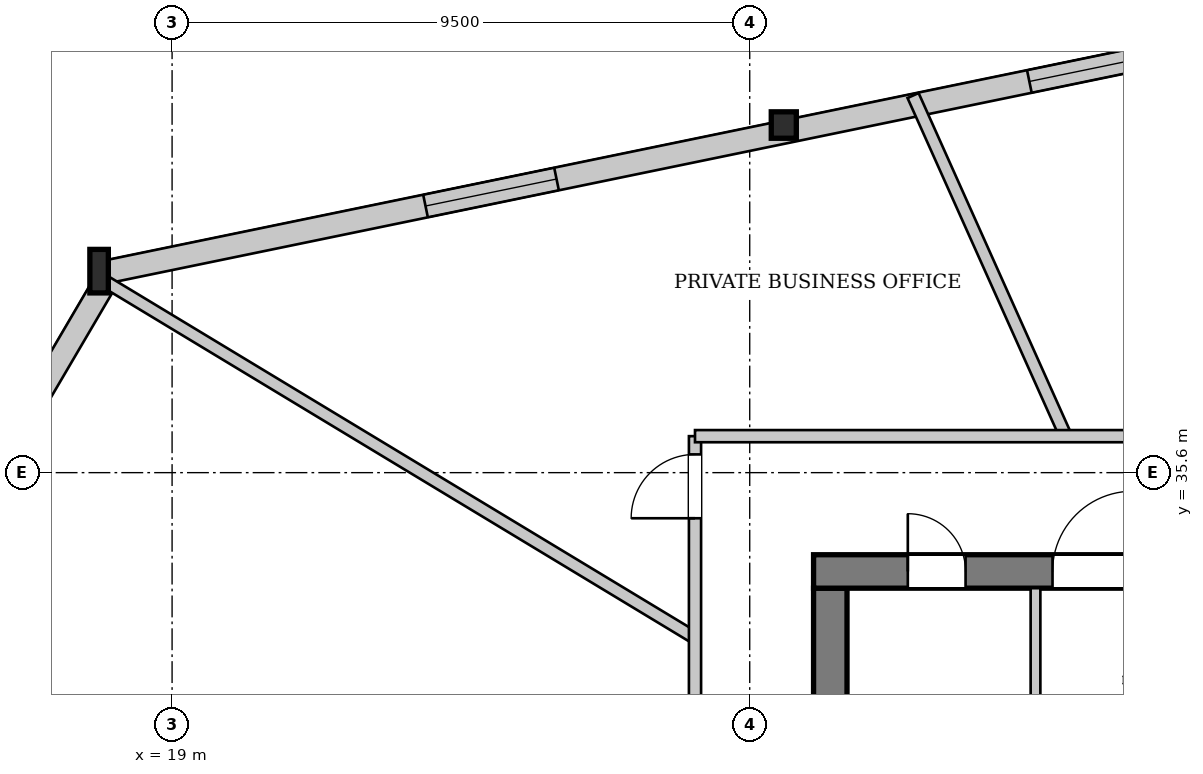
"""IFC4 building model, lengths in metres.
Left out: names, types, materials, properties, quantities, classifications, styles, units other than length and angle.
Written with IfcOpenShell. Run it as: python <this file> out.ifc"""

import sys

from ifc_helpers import new_model, si_unit, direction, frame, frame_2d, origin, origin_2d, place, context, subcontext, project, spatial, rectangle, i_section, extrude, source, transform, mapped, element, fill, save


model = new_model("IFC4")
c1 = context("Model", 3, precision=1e-05, world=origin(), true_north=direction((0.0, 1.0)))
c2 = subcontext(c1, "Body", "Model", "MODEL_VIEW")
j1 = project(units=[si_unit("LENGTHUNIT", "METRE"), si_unit("PLANEANGLEUNIT", "RADIAN")], contexts=[c1])
p1 = place(None, origin())
s1 = spatial("IfcSite", under=j1, at=p1, CompositionType="ELEMENT")
p2 = place(p1, origin())
s2 = spatial("IfcBuilding", under=s1, at=p2, CompositionType="ELEMENT")
p3 = place(p2, frame((0.0, 0.0, 146.6)))
s3 = spatial("IfcBuildingStorey", under=s2, at=p3, CompositionType="ELEMENT", Elevation=146.6)
m1 = source(origin(), c2, "Body", "SweptSolid", [
    extrude(i_section(OverallWidth=0.412, OverallDepth=0.435, WebThickness=0.031, FlangeThickness=0.05, at=origin_2d()), origin(), (0.0, 0.0, 1.0), 3.398),
])
p4 = place(p3, frame((29.172, 41.417, 0.0), z_axis=(-0.066021185682, -0.059124522107, 0.99606500487), x_axis=(0.667126517225, -0.74494443418, 0.0)))
e1 = element("IfcColumn", 1, at=p4, inside=s3, PredefinedType="COLUMN", context=c2, shape_type="MappedRepresentation", body=[
    mapped(m1, transform((0.0, 0.0, 0.0), x_axis=(1.0, 0.0, 0.0), y_axis=(0.0, 1.0, 0.0), z_axis=(0.0, 0.0, 1.0), scale=1.0)),
])
m2 = source(origin(), c2, "Body", "SweptSolid", [
    extrude(i_section(OverallWidth=0.304, OverallDepth=0.716, WebThickness=0.021, FlangeThickness=0.04, at=origin_2d()), origin(), (0.0, 0.0, 1.0), 3.408),
])
p5 = place(p3, frame((17.888, 39.09, 0.0), z_axis=(-0.0518677655, -0.103305687639, 0.993296365544), x_axis=(0.893682251955, -0.448700381703, 0.0)))
e2 = element("IfcColumn", 2, at=p5, inside=s3, PredefinedType="COLUMN", context=c2, shape_type="MappedRepresentation", body=[
    mapped(m2, transform((0.0, 0.0, 0.0), x_axis=(1.0, 0.0, 0.0), y_axis=(0.0, 1.0, 0.0), z_axis=(0.0, 0.0, 1.0), scale=1.0)),
])
p6 = place(p3, frame((20.25, 17.46, 0.0), z_axis=(0.0, 0.0, 1.0), x_axis=(-0.262728395916, 0.964869830588, 0.0)))
e3 = element("IfcWall", 3, at=p6, inside=s3, PredefinedType="SOLIDWALL", context=c2, shape_type="SweptSolid", body=[
    extrude(rectangle(XDim=18.003, YDim=0.32, at=frame_2d((9.002, 0.0))), origin(), (0.0, 0.0, 1.0), 2.692),
])
p7 = place(p6, frame((5.011, 0.0, 0.0)))
e4 = element("IfcOpeningElement", 4, at=p7, cuts=e3, PredefinedType="OPENING", context=c2, shape_type="SweptSolid", body=[
    extrude(rectangle(XDim=1.5, YDim=2.3, at=frame_2d((0.75, 1.15))), frame((0.0, 0.17, 0.0), z_axis=(0.0, -1.0, 0.0), x_axis=(1.0, 0.0, 0.0)), (0.0, 0.0, 1.0), 0.34),
])
p8 = place(p6, frame((12.022, 0.0, 0.25)))
e5 = element("IfcOpeningElement", 5, at=p8, cuts=e3, PredefinedType="OPENING", context=c2, shape_type="SweptSolid", body=[
    extrude(rectangle(XDim=2.6, YDim=2.35, at=frame_2d((1.3, 1.175))), frame((0.0, 0.17, 0.0), z_axis=(0.0, -1.0, 0.0), x_axis=(1.0, 0.0, 0.0)), (0.0, 0.0, 1.0), 0.34),
])
p9 = place(p3, frame((15.529, 34.693, 0.0), z_axis=(0.0, 0.0, 1.0), x_axis=(0.505994696014, 0.86253658914, 0.0)))
e6 = element("IfcWall", 6, at=p9, inside=s3, PredefinedType="SOLIDWALL", context=c2, shape_type="SweptSolid", body=[
    extrude(rectangle(XDim=4.986, YDim=0.38, at=frame_2d((2.493, 0.0))), origin(), (0.0, 0.0, 1.0), 2.692),
])
p10 = place(p3, frame((17.926, 38.903, 0.0), z_axis=(0.0, 0.0, 1.0), x_axis=(0.979384542026, 0.202004749552, 0.0)))
e7 = element("IfcWall", 7, at=p10, inside=s3, PredefinedType="SOLIDWALL", context=c2, shape_type="SweptSolid", body=[
    extrude(rectangle(XDim=23.044, YDim=0.38, at=frame_2d((11.522, 0.0))), origin(), (0.0, 0.0, 1.0), 2.692),
])
p11 = place(p10, frame((5.352, 0.0, 0.322)))
e8 = element("IfcOpeningElement", 8, at=p11, cuts=e7, PredefinedType="OPENING", context=c2, shape_type="SweptSolid", body=[
    extrude(rectangle(XDim=2.2, YDim=2.25, at=frame_2d((1.1, 1.125))), frame((0.0, 0.2, 0.0), z_axis=(0.0, -1.0, 0.0), x_axis=(1.0, 0.0, 0.0)), (0.0, 0.0, 1.0), 0.4),
])
p12 = place(p10, frame((15.492, 0.0, 0.322)))
e9 = element("IfcOpeningElement", 9, at=p12, cuts=e7, PredefinedType="OPENING", context=c2, shape_type="SweptSolid", body=[
    extrude(rectangle(XDim=2.2, YDim=2.25, at=frame_2d((1.1, 1.125))), frame((0.0, 0.2, 0.0), z_axis=(0.0, -1.0, 0.0), x_axis=(1.0, 0.0, 0.0)), (0.0, 0.0, 1.0), 0.4),
])
p13 = place(p3, frame((29.825, 19.5, 0.0), z_axis=(0.0, 0.0, 1.0), x_axis=(0.0, 1.0, 0.0)))
e10 = element("IfcWall", 10, at=p13, inside=s3, PredefinedType="SHEAR", context=c2, shape_type="SweptSolid", body=[
    extrude(rectangle(XDim=14.2, YDim=0.55, at=frame_2d((7.1, 0.0))), origin(), (0.0, 0.0, 1.0), 3.3),
])
p14 = place(p13, frame((7.42, 0.0, 0.0)))
e11 = element("IfcOpeningElement", 11, at=p14, cuts=e10, PredefinedType="OPENING", context=c2, shape_type="SweptSolid", body=[
    extrude(rectangle(XDim=1.6, YDim=2.2, at=frame_2d((0.8, 1.1))), frame((0.0, 0.285, 0.0), z_axis=(0.0, -1.0, 0.0), x_axis=(1.0, 0.0, 0.0)), (0.0, 0.0, 1.0), 0.57),
])
p15 = place(p3, frame((29.55, 33.975, 0.0), z_axis=(0.0, 0.0, 1.0), x_axis=(1.0, 0.0, 0.0)))
e12 = element("IfcWall", 12, at=p15, inside=s3, PredefinedType="SHEAR", context=c2, shape_type="SweptSolid", body=[
    extrude(rectangle(XDim=16.9, YDim=0.55, at=frame_2d((8.45, 0.0))), origin(), (0.0, 0.0, 1.0), 3.3),
])
p16 = place(p15, frame((1.55, 0.0, 0.0)))
e13 = element("IfcOpeningElement", 13, at=p16, cuts=e12, PredefinedType="OPENING", context=c2, shape_type="SweptSolid", body=[
    extrude(rectangle(XDim=0.95, YDim=2.1, at=frame_2d((0.475, 1.05))), frame((0.0, 0.285, 0.0), z_axis=(0.0, -1.0, 0.0), x_axis=(1.0, 0.0, 0.0)), (0.0, 0.0, 1.0), 0.57),
])
p17 = place(p15, frame((3.93, 0.0, 0.0)))
e14 = element("IfcOpeningElement", 14, at=p17, cuts=e12, PredefinedType="OPENING", context=c2, shape_type="SweptSolid", body=[
    extrude(rectangle(XDim=1.32, YDim=2.2, at=frame_2d((0.66, 1.1))), frame((0.0, 0.285, 0.0), z_axis=(0.0, -1.0, 0.0), x_axis=(1.0, 0.0, 0.0)), (0.0, 0.0, 1.0), 0.57),
])
p18 = place(p3, frame((33.2, 28.44, 0.0), z_axis=(0.0, 0.0, 1.0), x_axis=(0.0, 1.0, 0.0)))
e15 = element("IfcWall", 15, at=p18, inside=s3, PredefinedType="PARTITIONING", context=c2, shape_type="SweptSolid", body=[
    extrude(rectangle(XDim=5.26, YDim=0.16, at=frame_2d((2.63, 0.0))), origin(), (0.0, 0.0, 1.0), 3.3),
])
p19 = place(p3, frame((33.697, 36.2, 0.0), z_axis=(0.0, 0.0, 1.0), x_axis=(-0.408999948969, 0.912534405786, 0.0)))
e16 = element("IfcWall", 16, at=p19, inside=s3, PredefinedType="PARTITIONING", context=c2, shape_type="SweptSolid", body=[
    extrude(rectangle(XDim=6.139, YDim=0.2, at=frame_2d((3.069, 0.0))), origin(), (0.0, 0.0, 1.0), 3.3),
])
p20 = place(p3, frame((27.6, 32.883, 0.0), z_axis=(0.0, 0.0, 1.0), x_axis=(-0.855940231104, 0.517074772909, 0.0)))
e17 = element("IfcWall", 17, at=p20, inside=s3, PredefinedType="PARTITIONING", context=c2, shape_type="SweptSolid", body=[
    extrude(rectangle(XDim=11.489, YDim=0.2, at=frame_2d((5.744, 0.0))), origin(), (0.0, 0.0, 1.0), 2.895),
])
p21 = place(p3, frame((27.6, 17.0, 0.0), z_axis=(0.0, 0.0, 1.0), x_axis=(0.0, 1.0, 0.0)))
e18 = element("IfcWall", 18, at=p21, inside=s3, PredefinedType="PARTITIONING", context=c2, shape_type="SweptSolid", body=[
    extrude(rectangle(XDim=19.2, YDim=0.2, at=frame_2d((9.6, 0.0))), origin(), (0.0, 0.0, 1.0), 3.3),
])
p22 = place(p21, frame((17.85, 0.0, 0.0)))
e19 = element("IfcOpeningElement", 19, at=p22, cuts=e18, PredefinedType="OPENING", context=c2, shape_type="SweptSolid", body=[
    extrude(rectangle(XDim=1.05, YDim=2.2, at=frame_2d((0.525, 1.1))), frame((0.0, 0.11, 0.0), z_axis=(0.0, -1.0, 0.0), x_axis=(1.0, 0.0, 0.0)), (0.0, 0.0, 1.0), 0.22),
])
p23 = place(p21, frame((11.918, 0.0, 0.0)))
e20 = element("IfcOpeningElement", 20, at=p23, cuts=e18, PredefinedType="OPENING", context=c2, shape_type="SweptSolid", body=[
    extrude(rectangle(XDim=1.05, YDim=2.2, at=frame_2d((0.525, 1.1))), frame((0.0, 0.11, 0.0), z_axis=(0.0, -1.0, 0.0), x_axis=(1.0, 0.0, 0.0)), (0.0, 0.0, 1.0), 0.22),
])
p24 = place(p21, frame((4.311, 0.0, 0.0)))
e21 = element("IfcOpeningElement", 21, at=p24, cuts=e18, PredefinedType="OPENING", context=c2, shape_type="SweptSolid", body=[
    extrude(rectangle(XDim=1.05, YDim=2.2, at=frame_2d((0.525, 1.1))), frame((0.0, 0.11, 0.0), z_axis=(0.0, -1.0, 0.0), x_axis=(1.0, 0.0, 0.0)), (0.0, 0.0, 1.0), 0.22),
])
p25 = place(p3, frame((27.6, 36.2, 0.0), z_axis=(0.0, 0.0, 1.0), x_axis=(1.0, 0.0, 0.0)))
e22 = element("IfcWall", 22, at=p25, inside=s3, PredefinedType="PARTITIONING", context=c2, shape_type="SweptSolid", body=[
    extrude(rectangle(XDim=13.4, YDim=0.2, at=frame_2d((6.7, 0.0))), origin(), (0.0, 0.0, 1.0), 3.3),
])
p26 = place(p25, frame((8.266, 0.0, 0.0)))
e23 = element("IfcOpeningElement", 23, at=p26, cuts=e22, PredefinedType="OPENING", context=c2, shape_type="SweptSolid", body=[
    extrude(rectangle(XDim=1.05, YDim=2.2, at=frame_2d((0.525, 1.1))), frame((0.0, 0.11, 0.0), z_axis=(0.0, -1.0, 0.0), x_axis=(1.0, 0.0, 0.0)), (0.0, 0.0, 1.0), 0.22),
])
m3 = source(origin(), c2, "Body", "SweptSolid", [
    extrude(rectangle(XDim=2.2, YDim=2.25, at=frame_2d((1.1, 1.125))), frame((0.0, 0.03, 0.0), z_axis=(0.0, -1.0, 0.0), x_axis=(1.0, 0.0, 0.0)), (0.0, 0.0, 1.0), 0.06),
])
p27 = place(p11, origin())
e24 = element("IfcWindow", 24, at=p27, inside=s3, PartitioningType="SINGLE_PANEL", PredefinedType="WINDOW", context=c2, shape_type="MappedRepresentation", body=[
    mapped(m3, transform((0.0, 0.0, 0.0), x_axis=(1.0, 0.0, 0.0), y_axis=(0.0, 1.0, 0.0), z_axis=(0.0, 0.0, 1.0), scale=1.0)),
])
fill(e8, e24)
p28 = place(p12, origin())
e25 = element("IfcWindow", 25, at=p28, inside=s3, PartitioningType="SINGLE_PANEL", PredefinedType="WINDOW", context=c2, shape_type="MappedRepresentation", body=[
    mapped(m3, transform((0.0, 0.0, 0.0), x_axis=(1.0, 0.0, 0.0), y_axis=(0.0, 1.0, 0.0), z_axis=(0.0, 0.0, 1.0), scale=1.0)),
])
fill(e9, e25)
m4 = source(origin(), c2, "Body", "SweptSolid", [
    extrude(rectangle(XDim=0.95, YDim=2.1, at=frame_2d((0.475, 1.05))), frame((0.0, 0.025, 0.0), z_axis=(0.0, -1.0, 0.0), x_axis=(1.0, 0.0, 0.0)), (0.0, 0.0, 1.0), 0.05),
])
p29 = place(p16, origin())
e26 = element("IfcDoor", 26, at=p29, inside=s3, OperationType="SINGLE_SWING_LEFT", PredefinedType="DOOR", context=c2, shape_type="MappedRepresentation", body=[
    mapped(m4, transform((0.0, 0.0, 0.0), x_axis=(1.0, 0.0, 0.0), y_axis=(0.0, 1.0, 0.0), z_axis=(0.0, 0.0, 1.0), scale=1.0)),
])
fill(e13, e26)
m5 = source(origin(), c2, "Body", "SweptSolid", [
    extrude(rectangle(XDim=1.32, YDim=2.2, at=frame_2d((0.66, 1.1))), frame((0.0, 0.025, 0.0), z_axis=(0.0, -1.0, 0.0), x_axis=(1.0, 0.0, 0.0)), (0.0, 0.0, 1.0), 0.05),
])
p30 = place(p17, origin())
e27 = element("IfcDoor", 27, at=p30, inside=s3, OperationType="SINGLE_SWING_RIGHT", PredefinedType="DOOR", context=c2, shape_type="MappedRepresentation", body=[
    mapped(m5, transform((0.0, 0.0, 0.0), x_axis=(1.0, 0.0, 0.0), y_axis=(0.0, 1.0, 0.0), z_axis=(0.0, 0.0, 1.0), scale=1.0)),
])
fill(e14, e27)
m6 = source(origin(), c2, "Body", "SweptSolid", [
    extrude(rectangle(XDim=1.05, YDim=2.2, at=frame_2d((0.525, 1.1))), frame((0.0, 0.025, 0.0), z_axis=(0.0, -1.0, 0.0), x_axis=(1.0, 0.0, 0.0)), (0.0, 0.0, 1.0), 0.05),
])
p31 = place(p22, origin())
e28 = element("IfcDoor", 28, at=p31, inside=s3, OperationType="SINGLE_SWING_LEFT", PredefinedType="DOOR", context=c2, shape_type="MappedRepresentation", body=[
    mapped(m6, transform((0.0, 0.0, 0.0), x_axis=(1.0, 0.0, 0.0), y_axis=(0.0, 1.0, 0.0), z_axis=(0.0, 0.0, 1.0), scale=1.0)),
])
fill(e19, e28)
save(model, sys.argv[1])
